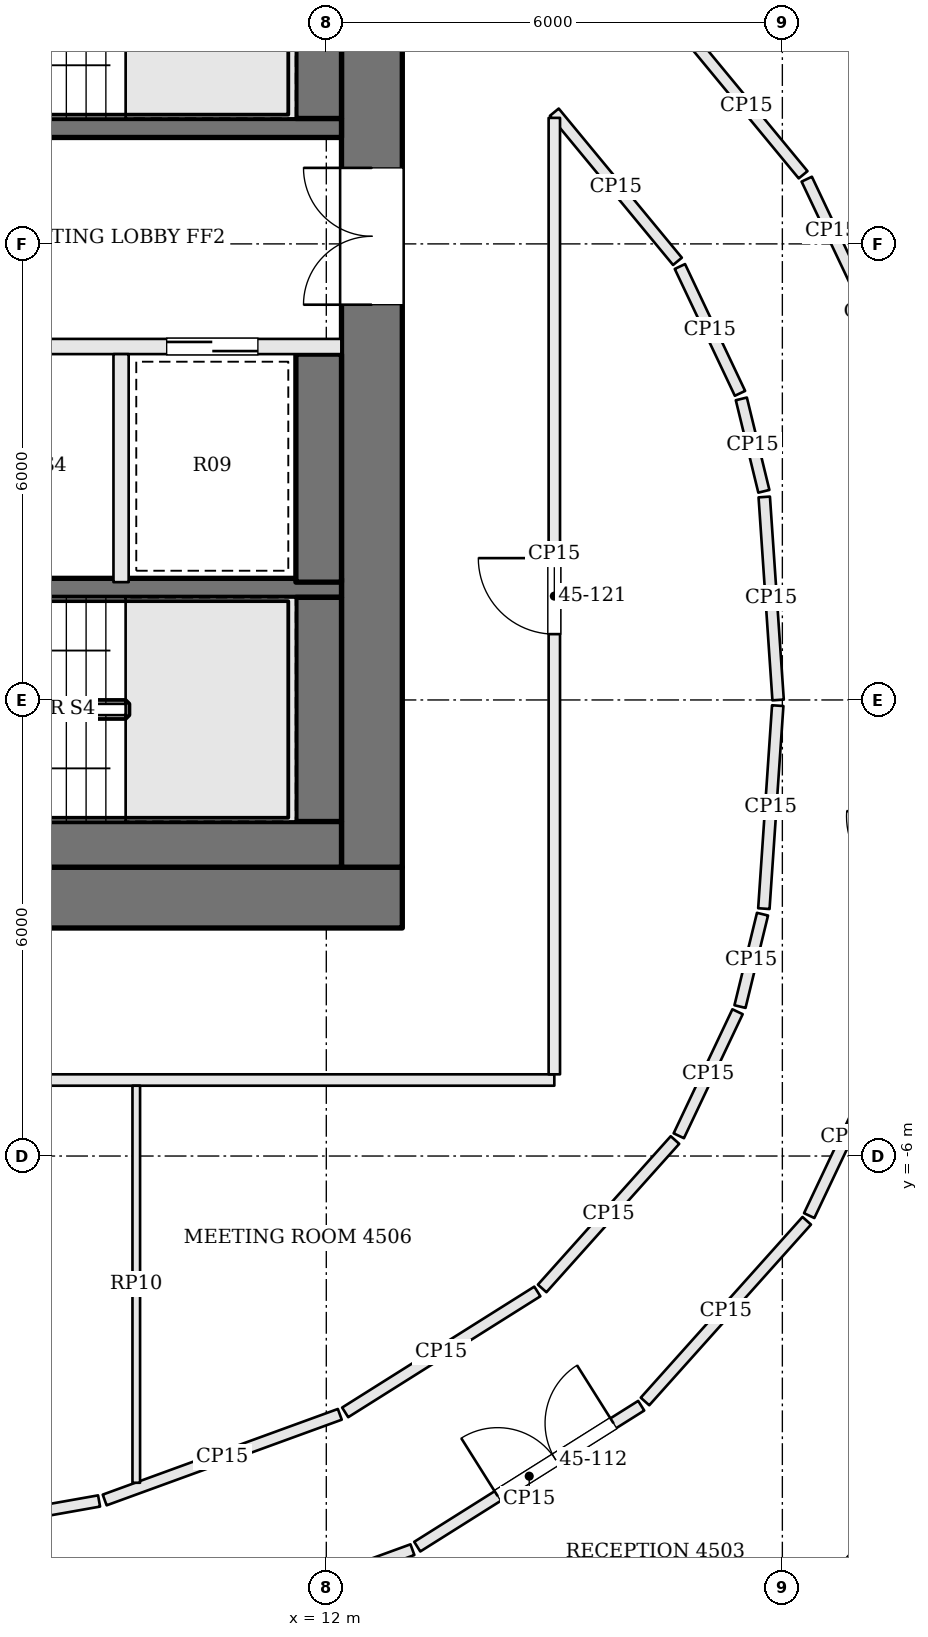
"""IFC4 building model, lengths in metres.
Left out: names, types, materials, properties, quantities, classifications, styles, units other than length and angle.
Written with IfcOpenShell. Run it as: python <this file> out.ifc"""

import sys

from ifc_helpers import new_model, si_unit, direction, frame, frame_2d, origin, place, context, subcontext, project, spatial, rectangle, extrude, element, fill, save


model = new_model("IFC4")
c1 = context("Model", 3, precision=1e-05, world=origin(), true_north=direction((0.0, 1.0)))
c2 = subcontext(c1, "Body", "Model", "MODEL_VIEW")
j1 = project(units=[si_unit("LENGTHUNIT", "METRE"), si_unit("PLANEANGLEUNIT", "RADIAN")], contexts=[c1])
p1 = place(None, origin())
s1 = spatial("IfcSite", under=j1, at=p1, CompositionType="ELEMENT")
p2 = place(p1, origin())
s2 = spatial("IfcBuilding", under=s1, at=p2, CompositionType="ELEMENT")
p3 = place(p2, frame((0.0, 0.0, 185.7)))
s3 = spatial("IfcBuildingStorey", under=s2, at=p3, CompositionType="ELEMENT", Elevation=185.7)
p4 = place(p3, frame((-13.0, -2.6, 0.0), z_axis=(0.0, 0.0, 1.0), x_axis=(1.0, 0.0, 0.0)))
e1 = element("IfcWall", 1, at=p4, inside=s3, PredefinedType="SHEAR", context=c2, shape_type="SweptSolid", body=[
    extrude(rectangle(XDim=26.0, YDim=0.8, at=frame_2d((13.0, 0.0))), origin(), (0.0, 0.0, 1.0), 3.9),
])
p5 = place(p4, frame((9.2, 0.0, 0.0)))
e2 = element("IfcOpeningElement", 2, at=p5, cuts=e1, PredefinedType="OPENING", context=c2, shape_type="SweptSolid", body=[
    extrude(rectangle(XDim=0.9, YDim=2.1, at=frame_2d((0.45, 1.05))), frame((0.0, 0.41, 0.0), z_axis=(0.0, -1.0, 0.0), x_axis=(1.0, 0.0, 0.0)), (0.0, 0.0, 1.0), 0.82),
])
p6 = place(p4, frame((12.3, 0.0, 0.0)))
e3 = element("IfcOpeningElement", 3, at=p6, cuts=e1, PredefinedType="OPENING", context=c2, shape_type="SweptSolid", body=[
    extrude(rectangle(XDim=0.9, YDim=2.1, at=frame_2d((0.45, 1.05))), frame((0.0, 0.41, 0.0), z_axis=(0.0, -1.0, 0.0), x_axis=(1.0, 0.0, 0.0)), (0.0, 0.0, 1.0), 0.82),
])
p7 = place(p4, frame((14.7, 0.0, 0.0)))
e4 = element("IfcOpeningElement", 4, at=p7, cuts=e1, PredefinedType="OPENING", context=c2, shape_type="SweptSolid", body=[
    extrude(rectangle(XDim=1.0, YDim=2.1, at=frame_2d((0.5, 1.05))), frame((0.0, 0.41, 0.0), z_axis=(0.0, -1.0, 0.0), x_axis=(1.0, 0.0, 0.0)), (0.0, 0.0, 1.0), 0.82),
])
p8 = place(p4, frame((16.55, 0.0, 0.0)))
e5 = element("IfcOpeningElement", 5, at=p8, cuts=e1, PredefinedType="OPENING", context=c2, shape_type="SweptSolid", body=[
    extrude(rectangle(XDim=0.9, YDim=2.1, at=frame_2d((0.45, 1.05))), frame((0.0, 0.41, 0.0), z_axis=(0.0, -1.0, 0.0), x_axis=(1.0, 0.0, 0.0)), (0.0, 0.0, 1.0), 0.82),
])
p9 = place(p3, frame((12.6, -2.2, 0.0), z_axis=(0.0, 0.0, 1.0), x_axis=(0.0, 1.0, 0.0)))
e6 = element("IfcWall", 6, at=p9, inside=s3, PredefinedType="SHEAR", context=c2, shape_type="SweptSolid", body=[
    extrude(rectangle(XDim=13.4, YDim=0.8, at=frame_2d((6.7, 0.0))), origin(), (0.0, 0.0, 1.0), 3.9),
])
p10 = place(p9, frame((7.4, 0.0, 0.0)))
e7 = element("IfcOpeningElement", 7, at=p10, cuts=e6, PredefinedType="OPENING", context=c2, shape_type="SweptSolid", body=[
    extrude(rectangle(XDim=1.8, YDim=2.1, at=frame_2d((0.9, 1.05))), frame((0.0, 0.41, 0.0), z_axis=(0.0, -1.0, 0.0), x_axis=(1.0, 0.0, 0.0)), (0.0, 0.0, 1.0), 0.82),
])
p11 = place(p3, frame((12.2, 7.525, 0.0), z_axis=(0.0, 0.0, 1.0), x_axis=(-1.0, 0.0, 0.0)))
e8 = element("IfcWall", 8, at=p11, inside=s3, PredefinedType="SOLIDWALL", context=c2, shape_type="SweptSolid", body=[
    extrude(rectangle(XDim=7.1, YDim=0.25, at=frame_2d((3.55, 0.0))), origin(), (0.0, 0.0, 1.0), 3.7),
])
p12 = place(p11, frame((5.8, 0.0, 0.0)))
e9 = element("IfcOpeningElement", 9, at=p12, cuts=e8, PredefinedType="OPENING", context=c2, shape_type="SweptSolid", body=[
    extrude(rectangle(XDim=1.2, YDim=2.1, at=frame_2d((0.6, 1.05))), frame((0.0, 0.135, 0.0), z_axis=(0.0, -1.0, 0.0), x_axis=(1.0, 0.0, 0.0)), (0.0, 0.0, 1.0), 0.27),
])
p13 = place(p3, frame((12.2, 4.65, 0.0), z_axis=(0.0, 0.0, 1.0), x_axis=(-1.0, 0.0, 0.0)))
e10 = element("IfcWall", 10, at=p13, inside=s3, PredefinedType="SOLIDWALL", context=c2, shape_type="SweptSolid", body=[
    extrude(rectangle(XDim=7.1, YDim=0.2, at=frame_2d((3.55, 0.0))), origin(), (0.0, 0.0, 1.0), 3.7),
])
p14 = place(p13, frame((4.4, 0.0, 0.0)))
e11 = element("IfcOpeningElement", 11, at=p14, cuts=e10, PredefinedType="OPENING", context=c2, shape_type="SweptSolid", body=[
    extrude(rectangle(XDim=1.2, YDim=2.1, at=frame_2d((0.6, 1.05))), frame((0.0, 0.11, 0.0), z_axis=(0.0, -1.0, 0.0), x_axis=(1.0, 0.0, 0.0)), (0.0, 0.0, 1.0), 0.22),
])
p15 = place(p13, frame((1.1, 0.0, 0.0)))
e12 = element("IfcOpeningElement", 12, at=p15, cuts=e10, PredefinedType="OPENING", context=c2, shape_type="SweptSolid", body=[
    extrude(rectangle(XDim=1.2, YDim=2.1, at=frame_2d((0.6, 1.05))), frame((0.0, 0.11, 0.0), z_axis=(0.0, -1.0, 0.0), x_axis=(1.0, 0.0, 0.0)), (0.0, 0.0, 1.0), 0.22),
])
p16 = place(p3, frame((12.2, 1.475, 0.0), z_axis=(0.0, 0.0, 1.0), x_axis=(-1.0, 0.0, 0.0)))
e13 = element("IfcWall", 13, at=p16, inside=s3, PredefinedType="SOLIDWALL", context=c2, shape_type="SweptSolid", body=[
    extrude(rectangle(XDim=7.1, YDim=0.25, at=frame_2d((3.55, 0.0))), origin(), (0.0, 0.0, 1.0), 3.7),
])
p17 = place(p16, frame((5.8, 0.0, 0.0)))
e14 = element("IfcOpeningElement", 14, at=p17, cuts=e13, PredefinedType="OPENING", context=c2, shape_type="SweptSolid", body=[
    extrude(rectangle(XDim=1.2, YDim=2.1, at=frame_2d((0.6, 1.05))), frame((0.0, 0.135, 0.0), z_axis=(0.0, -1.0, 0.0), x_axis=(1.0, 0.0, 0.0)), (0.0, 0.0, 1.0), 0.27),
])
p18 = place(p3, frame((9.3, 4.55, 0.0), z_axis=(0.0, 0.0, 1.0), x_axis=(0.0, -1.0, 0.0)))
e15 = element("IfcWall", 15, at=p18, inside=s3, PredefinedType="SOLIDWALL", context=c2, shape_type="SweptSolid", body=[
    extrude(rectangle(XDim=3.0, YDim=0.2, at=frame_2d((1.5, 0.0))), origin(), (0.0, 0.0, 1.0), 3.7),
])
p19 = place(p3, frame((11.9, 10.6, 0.0), z_axis=(0.0, 0.0, 1.0), x_axis=(0.0, -1.0, 0.0)))
e16 = element("IfcWall", 16, at=p19, inside=s3, PredefinedType="SOLIDWALL", context=c2, shape_type="SweptSolid", body=[
    extrude(rectangle(XDim=2.95, YDim=0.6, at=frame_2d((1.475, 0.0))), origin(), (0.0, 0.0, 1.0), 3.7),
])
p20 = place(p3, frame((11.9, 4.55, 0.0), z_axis=(0.0, 0.0, 1.0), x_axis=(0.0, -1.0, 0.0)))
e17 = element("IfcWall", 17, at=p20, inside=s3, PredefinedType="SOLIDWALL", context=c2, shape_type="SweptSolid", body=[
    extrude(rectangle(XDim=3.0, YDim=0.6, at=frame_2d((1.5, 0.0))), origin(), (0.0, 0.0, 1.0), 3.7),
])
p21 = place(p3, frame((11.9, 1.35, 0.0), z_axis=(0.0, 0.0, 1.0), x_axis=(0.0, -1.0, 0.0)))
e18 = element("IfcWall", 18, at=p21, inside=s3, PredefinedType="SOLIDWALL", context=c2, shape_type="SweptSolid", body=[
    extrude(rectangle(XDim=2.95, YDim=0.6, at=frame_2d((1.475, 0.0))), origin(), (0.0, 0.0, 1.0), 3.7),
])
p22 = place(p3, frame((12.2, -1.9, 0.0), z_axis=(0.0, 0.0, 1.0), x_axis=(-1.0, 0.0, 0.0)))
e19 = element("IfcWall", 19, at=p22, inside=s3, PredefinedType="SOLIDWALL", context=c2, shape_type="SweptSolid", body=[
    extrude(rectangle(XDim=7.1, YDim=0.6, at=frame_2d((3.55, 0.0))), origin(), (0.0, 0.0, 1.0), 3.7),
])
p23 = place(p3, frame((11.39, -11.814, 0.0), z_axis=(0.0, 0.0, 1.0), x_axis=(0.939639632456, 0.342165692491, 0.0)))
e20 = element("IfcWall", 20, at=p23, inside=s3, PredefinedType="PARTITIONING", context=c2, shape_type="SweptSolid", body=[
    extrude(rectangle(XDim=1.855, YDim=0.15, at=frame_2d((0.928, 0.0))), origin(), (0.0, 0.0, 1.0), 3.084),
])
p24 = place(p3, frame((13.197, -11.139, 0.0), z_axis=(0.0, 0.0, 1.0), x_axis=(0.846390903833, 0.532562144644, 0.0)))
e21 = element("IfcWall", 21, at=p24, inside=s3, PredefinedType="PARTITIONING", context=c2, shape_type="SweptSolid", body=[
    extrude(rectangle(XDim=3.481, YDim=0.15, at=frame_2d((1.741, 0.0))), origin(), (0.0, 0.0, 1.0), 3.084),
])
p25 = place(p24, frame((1.25, 0.0, 0.0)))
e22 = element("IfcOpeningElement", 22, at=p25, cuts=e21, PredefinedType="OPENING", context=c2, shape_type="SweptSolid", body=[
    extrude(rectangle(XDim=1.8, YDim=2.1, at=frame_2d((0.9, 1.05))), frame((0.0, 0.085, 0.0), z_axis=(0.0, -1.0, 0.0), x_axis=(1.0, 0.0, 0.0)), (0.0, 0.0, 1.0), 0.17),
])
p26 = place(p3, frame((16.193, -9.229, 0.0), z_axis=(0.0, 0.0, 1.0), x_axis=(0.666882089048, 0.745163256815, 0.0)))
e23 = element("IfcWall", 23, at=p26, inside=s3, PredefinedType="PARTITIONING", context=c2, shape_type="SweptSolid", body=[
    extrude(rectangle(XDim=3.19, YDim=0.15, at=frame_2d((1.595, 0.0))), origin(), (0.0, 0.0, 1.0), 3.084),
])
p27 = place(p3, frame((18.353, -6.784, 0.0), z_axis=(0.0, 0.0, 1.0), x_axis=(0.428086344739, 0.903737838894, 0.0)))
e24 = element("IfcWall", 24, at=p27, inside=s3, PredefinedType="PARTITIONING", context=c2, shape_type="SweptSolid", body=[
    extrude(rectangle(XDim=2.3, YDim=0.15, at=frame_2d((1.15, 0.0))), origin(), (0.0, 0.0, 1.0), 3.084),
])
p28 = place(p3, frame((18.964, 5.494, 0.0), z_axis=(0.0, 0.0, 1.0), x_axis=(-0.428135235203, 0.903714678633, 0.0)))
e25 = element("IfcWall", 25, at=p28, inside=s3, PredefinedType="PARTITIONING", context=c2, shape_type="SweptSolid", body=[
    extrude(rectangle(XDim=1.503, YDim=0.15, at=frame_2d((0.751, 0.0))), origin(), (0.0, 0.0, 1.0), 3.084),
])
p29 = place(p3, frame((18.273, 6.909, 0.0), z_axis=(0.0, 0.0, 1.0), x_axis=(-0.63653648943, 0.771246586783, 0.0)))
e26 = element("IfcWall", 26, at=p29, inside=s3, PredefinedType="PARTITIONING", context=c2, shape_type="SweptSolid", body=[
    extrude(rectangle(XDim=2.342, YDim=0.15, at=frame_2d((1.171, 0.0))), origin(), (0.0, 0.0, 1.0), 3.084),
])
p30 = place(p3, frame((15.0, 7.733, 0.0), z_axis=(0.0, 0.0, 1.0), x_axis=(0.636601263488, -0.771193121938, 0.0)))
e27 = element("IfcWall", 27, at=p30, inside=s3, PredefinedType="PARTITIONING", context=c2, shape_type="SweptSolid", body=[
    extrude(rectangle(XDim=2.545, YDim=0.15, at=frame_2d((1.272, 0.0))), origin(), (0.0, 0.0, 1.0), 3.084),
])
p31 = place(p3, frame((16.652, 5.702, 0.0), z_axis=(0.0, 0.0, 1.0), x_axis=(0.428126129773, -0.903718992279, 0.0)))
e28 = element("IfcWall", 28, at=p31, inside=s3, PredefinedType="PARTITIONING", context=c2, shape_type="SweptSolid", body=[
    extrude(rectangle(XDim=1.846, YDim=0.15, at=frame_2d((0.923, 0.0))), origin(), (0.0, 0.0, 1.0), 3.084),
])
p32 = place(p3, frame((17.46, 3.961, 0.0), z_axis=(0.0, 0.0, 1.0), x_axis=(0.236655249498, -0.971593687137, 0.0)))
e29 = element("IfcWall", 29, at=p32, inside=s3, PredefinedType="PARTITIONING", context=c2, shape_type="SweptSolid", body=[
    extrude(rectangle(XDim=1.251, YDim=0.15, at=frame_2d((0.626, 0.0))), origin(), (0.0, 0.0, 1.0), 3.084),
])
p33 = place(p3, frame((17.762, 2.67, 0.0), z_axis=(0.0, 0.0, 1.0), x_axis=(0.068135311644, -0.997676089373, 0.0)))
e30 = element("IfcWall", 30, at=p33, inside=s3, PredefinedType="PARTITIONING", context=c2, shape_type="SweptSolid", body=[
    extrude(rectangle(XDim=2.677, YDim=0.15, at=frame_2d((1.338, 0.0))), origin(), (0.0, 0.0, 1.0), 3.084),
])
p34 = place(p3, frame((17.939, -0.075, 0.0), z_axis=(0.0, 0.0, 1.0), x_axis=(-0.068226099283, -0.99766988497, 0.0)))
e31 = element("IfcWall", 31, at=p34, inside=s3, PredefinedType="PARTITIONING", context=c2, shape_type="SweptSolid", body=[
    extrude(rectangle(XDim=2.677, YDim=0.15, at=frame_2d((1.338, 0.0))), origin(), (0.0, 0.0, 1.0), 3.084),
])
p35 = place(p3, frame((17.739, -2.818, 0.0), z_axis=(0.0, 0.0, 1.0), x_axis=(-0.236884307907, -0.971537865792, 0.0)))
e32 = element("IfcWall", 32, at=p35, inside=s3, PredefinedType="PARTITIONING", context=c2, shape_type="SweptSolid", body=[
    extrude(rectangle(XDim=1.251, YDim=0.15, at=frame_2d((0.625, 0.0))), origin(), (0.0, 0.0, 1.0), 3.084),
])
p36 = place(p3, frame((17.41, -4.102, 0.0), z_axis=(0.0, 0.0, 1.0), x_axis=(-0.428074720318, -0.903743345107, 0.0)))
e33 = element("IfcWall", 33, at=p36, inside=s3, PredefinedType="PARTITIONING", context=c2, shape_type="SweptSolid", body=[
    extrude(rectangle(XDim=1.806, YDim=0.15, at=frame_2d((0.903, 0.0))), origin(), (0.0, 0.0, 1.0), 3.084),
])
p37 = place(p3, frame((16.587, -5.789, 0.0), z_axis=(0.0, 0.0, 1.0), x_axis=(-0.666887460656, -0.745158449472, 0.0)))
e34 = element("IfcWall", 34, at=p37, inside=s3, PredefinedType="PARTITIONING", context=c2, shape_type="SweptSolid", body=[
    extrude(rectangle(XDim=2.62, YDim=0.15, at=frame_2d((1.31, 0.0))), origin(), (0.0, 0.0, 1.0), 3.084),
])
p38 = place(p3, frame((14.777, -7.781, 0.0), z_axis=(0.0, 0.0, 1.0), x_axis=(-0.846359741043, -0.532611667862, 0.0)))
e35 = element("IfcWall", 35, at=p38, inside=s3, PredefinedType="PARTITIONING", context=c2, shape_type="SweptSolid", body=[
    extrude(rectangle(XDim=2.987, YDim=0.15, at=frame_2d((1.494, 0.0))), origin(), (0.0, 0.0, 1.0), 3.084),
])
p39 = place(p3, frame((12.178, -9.398, 0.0), z_axis=(0.0, 0.0, 1.0), x_axis=(-0.939609240084, -0.342249143093, 0.0)))
e36 = element("IfcWall", 36, at=p39, inside=s3, PredefinedType="PARTITIONING", context=c2, shape_type="SweptSolid", body=[
    extrude(rectangle(XDim=3.292, YDim=0.15, at=frame_2d((1.646, 0.0))), origin(), (0.0, 0.0, 1.0), 3.084),
])
p40 = place(p3, frame((9.01, -10.538, 0.0), z_axis=(0.0, 0.0, 1.0), x_axis=(-0.984645638575, -0.174565077936, 0.0)))
e37 = element("IfcWall", 37, at=p40, inside=s3, PredefinedType="PARTITIONING", context=c2, shape_type="SweptSolid", body=[
    extrude(rectangle(XDim=4.358, YDim=0.15, at=frame_2d((2.179, 0.0))), origin(), (0.0, 0.0, 1.0), 3.084),
])
p41 = place(p3, frame((-14.925, -5.0, 0.0), z_axis=(0.0, 0.0, 1.0), x_axis=(1.0, 0.0, 0.0)))
e38 = element("IfcWall", 38, at=p41, inside=s3, PredefinedType="PARTITIONING", context=c2, shape_type="SweptSolid", body=[
    extrude(rectangle(XDim=29.925, YDim=0.15, at=frame_2d((14.962, 0.0))), origin(), (0.0, 0.0, 1.0), 3.084),
])
p42 = place(p41, frame((14.025, 0.0, 0.0)))
e39 = element("IfcOpeningElement", 39, at=p42, cuts=e38, PredefinedType="OPENING", context=c2, shape_type="SweptSolid", body=[
    extrude(rectangle(XDim=1.8, YDim=2.1, at=frame_2d((0.9, 1.05))), frame((0.0, 0.085, 0.0), z_axis=(0.0, -1.0, 0.0), x_axis=(1.0, 0.0, 0.0)), (0.0, 0.0, 1.0), 0.17),
])
p43 = place(p3, frame((15.0, -4.925, 0.0), z_axis=(0.0, 0.0, 1.0), x_axis=(0.0, 1.0, 0.0)))
e40 = element("IfcWall", 40, at=p43, inside=s3, PredefinedType="PARTITIONING", context=c2, shape_type="SweptSolid", body=[
    extrude(rectangle(XDim=12.583, YDim=0.15, at=frame_2d((6.292, 0.0))), origin(), (0.0, 0.0, 1.0), 3.084),
])
p44 = place(p43, frame((5.791, 0.0, 0.0)))
e41 = element("IfcOpeningElement", 41, at=p44, cuts=e40, PredefinedType="OPENING", context=c2, shape_type="SweptSolid", body=[
    extrude(rectangle(XDim=1.0, YDim=2.4, at=frame_2d((0.5, 1.2))), frame((0.0, 0.085, 0.0), z_axis=(0.0, -1.0, 0.0), x_axis=(1.0, 0.0, 0.0)), (0.0, 0.0, 1.0), 0.17),
])
p45 = place(p3, frame((20.45, -9.571, 0.0), z_axis=(0.0, 0.0, 1.0), x_axis=(-0.666910888996, -0.745137481368, 0.0)))
e42 = element("IfcWall", 42, at=p45, inside=s3, PredefinedType="PARTITIONING", context=c2, shape_type="SweptSolid", body=[
    extrude(rectangle(XDim=3.136, YDim=0.1, at=frame_2d((1.568, 0.0))), origin(), (0.0, 0.0, 1.0), 3.084),
])
p46 = place(p3, frame((9.5, -10.299, 0.0), z_axis=(0.0, 0.0, 1.0), x_axis=(0.0, 1.0, 0.0)))
e43 = element("IfcWall", 43, at=p46, inside=s3, PredefinedType="PARTITIONING", context=c2, shape_type="SweptSolid", body=[
    extrude(rectangle(XDim=5.224, YDim=0.1, at=frame_2d((2.612, 0.0))), origin(), (0.0, 0.0, 1.0), 3.084),
])
p47 = place(p10, origin())
e44 = element("IfcDoor", 44, at=p47, inside=s3, OperationType="DOUBLE_DOOR_SINGLE_SWING", PredefinedType="DOOR", context=c2, shape_type="SweptSolid", body=[
    extrude(rectangle(XDim=1.8, YDim=2.1, at=frame_2d((0.9, 1.05))), frame((0.0, 0.025, 0.0), z_axis=(0.0, -1.0, 0.0), x_axis=(1.0, 0.0, 0.0)), (0.0, 0.0, 1.0), 0.05),
])
fill(e7, e44)
p48 = place(p15, origin())
e45 = element("IfcDoor", 45, at=p48, inside=s3, OperationType="SLIDING_TO_RIGHT", PredefinedType="DOOR", context=c2, shape_type="SweptSolid", body=[
    extrude(rectangle(XDim=1.2, YDim=2.1, at=frame_2d((0.6, 1.05))), frame((0.0, 0.025, 0.0), z_axis=(0.0, -1.0, 0.0), x_axis=(1.0, 0.0, 0.0)), (0.0, 0.0, 1.0), 0.05),
])
fill(e12, e45)
p49 = place(p25, origin())
e46 = element("IfcDoor", 46, at=p49, inside=s3, OperationType="DOUBLE_DOOR_SINGLE_SWING", PredefinedType="DOOR", context=c2, shape_type="SweptSolid", body=[
    extrude(rectangle(XDim=1.8, YDim=2.1, at=frame_2d((0.9, 1.05))), frame((0.0, 0.025, 0.0), z_axis=(0.0, -1.0, 0.0), x_axis=(1.0, 0.0, 0.0)), (0.0, 0.0, 1.0), 0.05),
])
fill(e22, e46)
p50 = place(p44, origin())
e47 = element("IfcDoor", 47, at=p50, inside=s3, OperationType="SINGLE_SWING_RIGHT", PredefinedType="DOOR", context=c2, shape_type="SweptSolid", body=[
    extrude(rectangle(XDim=1.0, YDim=2.4, at=frame_2d((0.5, 1.2))), frame((0.0, 0.025, 0.0), z_axis=(0.0, -1.0, 0.0), x_axis=(1.0, 0.0, 0.0)), (0.0, 0.0, 1.0), 0.05),
])
fill(e41, e47)
save(model, sys.argv[1])
